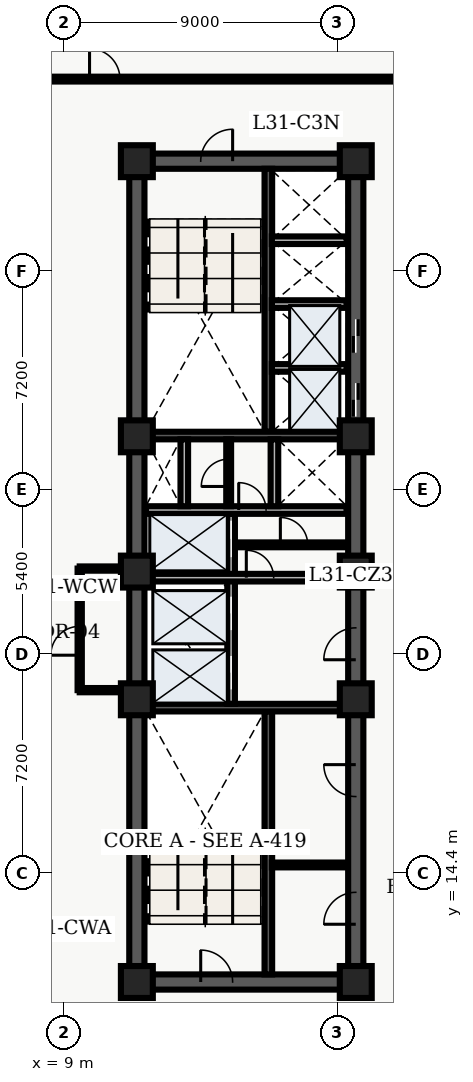
"""IFC4 building model, lengths in metres.
Left out: names, types, materials, properties, quantities, classifications, styles, units other than length and angle.
Written with IfcOpenShell. Run it as: python <this file> out.ifc"""

import sys

from ifc_helpers import new_model, entity, si_unit, converted_unit, direction, frame, origin_with_axes, origin_2d_with_axis, place, context, subcontext, project, spatial, polyline, rectangle, outline, extrude, element, fill, save


model = new_model("IFC4")
c1 = context("Model", 3, precision=1e-05, world=origin_with_axes(), true_north=direction((0.0, 1.0)))
c2 = subcontext(c1, "Body", "Model", "MODEL_VIEW")
j1 = project(units=[si_unit("LENGTHUNIT", "METRE"), converted_unit("PLANEANGLEUNIT", "DEGREE", entity("IfcPlaneAngleMeasure", 0.017), si_unit("PLANEANGLEUNIT", "RADIAN"), dimensions=[0, 0, 0, 0, 0, 0, 0])], contexts=[c1])
p1 = place(None, origin_with_axes())
s1 = spatial("IfcSite", under=j1, at=p1, CompositionType="ELEMENT")
p2 = place(p1, origin_with_axes())
s2 = spatial("IfcBuilding", under=s1, at=p2, CompositionType="ELEMENT")
p3 = place(p2, frame((0.0, 0.0, 129.0), z_axis=(0.0, 0.0, 1.0), x_axis=(1.0, 0.0, 0.0)))
s3 = spatial("IfcBuildingStorey", under=s2, at=p3, CompositionType="ELEMENT", Elevation=129.0)
p4 = place(p3, frame((11.4, 10.8, 0.0), z_axis=(0.0, 0.0, 1.0), x_axis=(0.0, 1.0, 0.0)))
e1 = element("IfcWall", 1, at=p4, inside=s3, PredefinedType="SHEAR", context=c2, shape_type="SweptSolid", body=[
    extrude(outline(polyline([(0.0, -0.25), (27.0, -0.25), (27.0, 0.25), (0.0, 0.25), (0.0, -0.25)])), origin_with_axes(), (0.0, 0.0, 1.0), 3.66),
])
p5 = place(p3, frame((11.4, 10.8, 0.0), z_axis=(0.0, 0.0, 1.0), x_axis=(1.0, 0.0, 0.0)))
e2 = element("IfcWall", 2, at=p5, inside=s3, PredefinedType="SHEAR", context=c2, shape_type="SweptSolid", body=[
    extrude(outline(polyline([(0.0, -0.25), (7.2, -0.25), (7.2, 0.25), (0.0, 0.25), (0.0, -0.25)])), origin_with_axes(), (0.0, 0.0, 1.0), 3.66),
])
p6 = place(p5, frame((2.625, 0.0, 0.0), z_axis=(0.0, 0.0, 1.0), x_axis=(1.0, 0.0, 0.0)))
e3 = element("IfcOpeningElement", 3, at=p6, cuts=e2, PredefinedType="OPENING", context=c2, shape_type="SweptSolid", body=[
    extrude(rectangle(XDim=1.05, YDim=0.52, at=origin_2d_with_axis()), origin_with_axes(), (0.0, 0.0, 1.0), 2.15),
])
p7 = place(p3, frame((11.4, 37.8, 0.0), z_axis=(0.0, 0.0, 1.0), x_axis=(1.0, 0.0, 0.0)))
e4 = element("IfcWall", 4, at=p7, inside=s3, PredefinedType="SHEAR", context=c2, shape_type="SweptSolid", body=[
    extrude(outline(polyline([(0.0, -0.25), (7.2, -0.25), (7.2, 0.25), (0.0, 0.25), (0.0, -0.25)])), origin_with_axes(), (0.0, 0.0, 1.0), 3.66),
])
p8 = place(p7, frame((2.625, 0.0, 0.0), z_axis=(0.0, 0.0, 1.0), x_axis=(1.0, 0.0, 0.0)))
e5 = element("IfcOpeningElement", 5, at=p8, cuts=e4, PredefinedType="OPENING", context=c2, shape_type="SweptSolid", body=[
    extrude(rectangle(XDim=1.05, YDim=0.52, at=origin_2d_with_axis()), origin_with_axes(), (0.0, 0.0, 1.0), 2.15),
])
p9 = place(p3, frame((18.6, 10.8, 0.0), z_axis=(0.0, 0.0, 1.0), x_axis=(0.0, 1.0, 0.0)))
e6 = element("IfcWall", 6, at=p9, inside=s3, PredefinedType="SHEAR", context=c2, shape_type="SweptSolid", body=[
    extrude(outline(polyline([(0.0, -0.25), (13.5, -0.25), (13.5, 0.25), (0.0, 0.25), (0.0, -0.25)])), origin_with_axes(), (0.0, 0.0, 1.0), 3.66),
])
p10 = place(p9, frame((11.125, 0.0, 0.0), z_axis=(0.0, 0.0, 1.0), x_axis=(1.0, 0.0, 0.0)))
e7 = element("IfcOpeningElement", 7, at=p10, cuts=e6, PredefinedType="OPENING", context=c2, shape_type="SweptSolid", body=[
    extrude(rectangle(XDim=1.05, YDim=0.52, at=origin_2d_with_axis()), origin_with_axes(), (0.0, 0.0, 1.0), 2.15),
])
p11 = place(p9, frame((2.425, 0.0, 0.0), z_axis=(0.0, 0.0, 1.0), x_axis=(1.0, 0.0, 0.0)))
e8 = element("IfcOpeningElement", 8, at=p11, cuts=e6, PredefinedType="OPENING", context=c2, shape_type="SweptSolid", body=[
    extrude(rectangle(XDim=1.05, YDim=0.52, at=origin_2d_with_axis()), origin_with_axes(), (0.0, 0.0, 1.0), 2.15),
])
p12 = place(p9, frame((6.625, 0.0, 0.0), z_axis=(0.0, 0.0, 1.0), x_axis=(1.0, 0.0, 0.0)))
e9 = element("IfcOpeningElement", 9, at=p12, cuts=e6, PredefinedType="OPENING", context=c2, shape_type="SweptSolid", body=[
    extrude(rectangle(XDim=1.05, YDim=0.52, at=origin_2d_with_axis()), origin_with_axes(), (0.0, 0.0, 1.0), 2.15),
])
p13 = place(p3, frame((18.6, 24.3, 0.0), z_axis=(0.0, 0.0, 1.0), x_axis=(0.0, 1.0, 0.0)))
e10 = element("IfcWall", 10, at=p13, inside=s3, PredefinedType="SHEAR", context=c2, shape_type="SweptSolid", body=[
    extrude(outline(polyline([(0.0, -0.25), (13.5, -0.25), (13.5, 0.25), (0.0, 0.25), (0.0, -0.25)])), origin_with_axes(), (0.0, 0.0, 1.0), 3.66),
])
p14 = place(p13, frame((5.65, 0.0, 0.0), z_axis=(0.0, 0.0, 1.0), x_axis=(1.0, 0.0, 0.0)))
e11 = element("IfcOpeningElement", 11, at=p14, cuts=e10, PredefinedType="OPENING", context=c2, shape_type="SweptSolid", body=[
    extrude(rectangle(XDim=1.1, YDim=0.52, at=origin_2d_with_axis()), origin_with_axes(), (0.0, 0.0, 1.0), 2.15),
])
p15 = place(p13, frame((7.75, 0.0, 0.0), z_axis=(0.0, 0.0, 1.0), x_axis=(1.0, 0.0, 0.0)))
e12 = element("IfcOpeningElement", 12, at=p15, cuts=e10, PredefinedType="OPENING", context=c2, shape_type="SweptSolid", body=[
    extrude(rectangle(XDim=1.1, YDim=0.52, at=origin_2d_with_axis()), origin_with_axes(), (0.0, 0.0, 1.0), 2.15),
])
p16 = place(p3, frame((15.725, 11.05, 0.0), z_axis=(0.0, 0.0, 1.0), x_axis=(0.0, 1.0, 0.0)))
e13 = element("IfcWall", 13, at=p16, inside=s3, PredefinedType="SHEAR", context=c2, shape_type="SweptSolid", body=[
    extrude(outline(polyline([(0.0, -0.125), (8.65, -0.125), (8.65, 0.125), (0.0, 0.125), (0.0, -0.125)])), origin_with_axes(), (0.0, 0.0, 1.0), 3.66),
])
p17 = place(p3, frame((11.65, 19.825, 0.0), z_axis=(0.0, 0.0, 1.0), x_axis=(1.0, 0.0, 0.0)))
e14 = element("IfcWall", 14, at=p17, inside=s3, PredefinedType="SHEAR", context=c2, shape_type="SweptSolid", body=[
    extrude(outline(polyline([(0.0, -0.125), (6.7, -0.125), (6.7, 0.125), (0.0, 0.125), (0.0, -0.125)])), origin_with_axes(), (0.0, 0.0, 1.0), 3.66),
])
p18 = place(p3, frame((15.725, 28.9, 0.0), z_axis=(0.0, 0.0, 1.0), x_axis=(0.0, 1.0, 0.0)))
e15 = element("IfcWall", 15, at=p18, inside=s3, PredefinedType="SHEAR", context=c2, shape_type="SweptSolid", body=[
    extrude(outline(polyline([(0.0, -0.125), (8.65, -0.125), (8.65, 0.125), (0.0, 0.125), (0.0, -0.125)])), origin_with_axes(), (0.0, 0.0, 1.0), 3.66),
])
p19 = place(p3, frame((11.65, 28.775, 0.0), z_axis=(0.0, 0.0, 1.0), x_axis=(1.0, 0.0, 0.0)))
e16 = element("IfcWall", 16, at=p19, inside=s3, PredefinedType="SHEAR", context=c2, shape_type="SweptSolid", body=[
    extrude(outline(polyline([(0.0, -0.125), (6.7, -0.125), (6.7, 0.125), (0.0, 0.125), (0.0, -0.125)])), origin_with_axes(), (0.0, 0.0, 1.0), 3.66),
])
p20 = place(p3, frame((14.5, 19.95, 0.0), z_axis=(0.0, 0.0, 1.0), x_axis=(0.0, 1.0, 0.0)))
e17 = element("IfcWall", 17, at=p20, inside=s3, PredefinedType="SOLIDWALL", context=c2, shape_type="SweptSolid", body=[
    extrude(outline(polyline([(0.0, -0.125), (6.25, -0.125), (6.25, 0.125), (0.0, 0.125), (0.0, -0.125)])), origin_with_axes(), (0.0, 0.0, 1.0), 2.7),
])
p21 = place(p20, frame((1.025, 0.0, 0.0), z_axis=(0.0, 0.0, 1.0), x_axis=(1.0, 0.0, 0.0)))
e18 = element("IfcOpeningElement", 18, at=p21, cuts=e17, PredefinedType="OPENING", context=c2, shape_type="SweptSolid", body=[
    extrude(rectangle(XDim=1.1, YDim=0.27, at=origin_2d_with_axis()), origin_with_axes(), (0.0, 0.0, 1.0), 2.15),
])
p22 = place(p20, frame((2.975, 0.0, 0.0), z_axis=(0.0, 0.0, 1.0), x_axis=(1.0, 0.0, 0.0)))
e19 = element("IfcOpeningElement", 19, at=p22, cuts=e17, PredefinedType="OPENING", context=c2, shape_type="SweptSolid", body=[
    extrude(rectangle(XDim=1.1, YDim=0.27, at=origin_2d_with_axis()), origin_with_axes(), (0.0, 0.0, 1.0), 2.15),
])
p23 = place(p20, frame((5.425, 0.0, 0.0), z_axis=(0.0, 0.0, 1.0), x_axis=(1.0, 0.0, 0.0)))
e20 = element("IfcOpeningElement", 20, at=p23, cuts=e17, PredefinedType="OPENING", context=c2, shape_type="SweptSolid", body=[
    extrude(rectangle(XDim=1.2, YDim=0.27, at=origin_2d_with_axis()), origin_with_axes(), (0.0, 0.0, 1.0), 2.15),
])
p24 = place(p3, frame((11.7, 24.1, 0.0), z_axis=(0.0, 0.0, 1.0), x_axis=(1.0, 0.0, 0.0)))
e21 = element("IfcWall", 21, at=p24, inside=s3, PredefinedType="SOLIDWALL", context=c2, shape_type="SweptSolid", body=[
    extrude(outline(polyline([(0.0, -0.125), (6.6, -0.125), (6.6, 0.125), (0.0, 0.125), (0.0, -0.125)])), origin_with_axes(), (0.0, 0.0, 1.0), 2.7),
])
p25 = place(p24, frame((3.75, 0.0, 0.0), z_axis=(0.0, 0.0, 1.0), x_axis=(1.0, 0.0, 0.0)))
e22 = element("IfcOpeningElement", 22, at=p25, cuts=e21, PredefinedType="OPENING", context=c2, shape_type="SweptSolid", body=[
    extrude(rectangle(XDim=0.9, YDim=0.27, at=origin_2d_with_axis()), origin_with_axes(), (0.0, 0.0, 1.0), 2.15),
])
p26 = place(p3, frame((11.7, 26.325, 0.0), z_axis=(0.0, 0.0, 1.0), x_axis=(1.0, 0.0, 0.0)))
e23 = element("IfcWall", 23, at=p26, inside=s3, PredefinedType="SOLIDWALL", context=c2, shape_type="SweptSolid", body=[
    extrude(outline(polyline([(0.0, -0.125), (6.6, -0.125), (6.6, 0.125), (0.0, 0.125), (0.0, -0.125)])), origin_with_axes(), (0.0, 0.0, 1.0), 2.7),
])
p27 = place(p26, frame((3.5, 0.0, 0.0), z_axis=(0.0, 0.0, 1.0), x_axis=(1.0, 0.0, 0.0)))
e24 = element("IfcOpeningElement", 24, at=p27, cuts=e23, PredefinedType="OPENING", context=c2, shape_type="SweptSolid", body=[
    extrude(rectangle(XDim=0.9, YDim=0.27, at=origin_2d_with_axis()), origin_with_axes(), (0.0, 0.0, 1.0), 2.15),
])
for number, where, z_axis, x_axis in (
    (25, (12.96, 26.45, 0.0), (0.0, 0.0, 1.0), (0.0, 1.0, 0.0)),
    (26, (15.925, 26.45, 0.0), (0.0, 0.0, 1.0), (0.0, 1.0, 0.0)),
):
    element("IfcWall", number, at=place(p3, frame(where, z_axis=z_axis, x_axis=x_axis)), inside=s3, PredefinedType="SOLIDWALL", context=c2, shape_type="SweptSolid", body=[
        extrude(outline(polyline([(0.0, -0.125), (2.2, -0.125), (2.2, 0.125), (0.0, 0.125), (0.0, -0.125)])), origin_with_axes(), (0.0, 0.0, 1.0), 2.7),
    ])
for number, where, z_axis, x_axis in (
    (27, (11.4, 10.8, 0.0), (0.0, 0.0, 1.0), (1.0, 0.0, 0.0)),
    (28, (11.4, 20.1, 0.0), (0.0, 0.0, 1.0), (1.0, 0.0, 0.0)),
    (29, (11.4, 24.3, 0.0), (0.0, 0.0, 1.0), (1.0, 0.0, 0.0)),
    (30, (11.4, 28.75, 0.0), (0.0, 0.0, 1.0), (1.0, 0.0, 0.0)),
    (31, (11.4, 37.8, 0.0), (0.0, 0.0, 1.0), (1.0, 0.0, 0.0)),
    (32, (18.6, 10.8, 0.0), (0.0, 0.0, 1.0), (1.0, 0.0, 0.0)),
    (33, (18.6, 20.1, 0.0), (0.0, 0.0, 1.0), (1.0, 0.0, 0.0)),
    (34, (18.6, 24.3, 0.0), (0.0, 0.0, 1.0), (1.0, 0.0, 0.0)),
    (35, (18.6, 28.75, 0.0), (0.0, 0.0, 1.0), (1.0, 0.0, 0.0)),
    (36, (18.6, 37.8, 0.0), (0.0, 0.0, 1.0), (1.0, 0.0, 0.0)),
):
    element("IfcColumn", number, at=place(p3, frame(where, z_axis=z_axis, x_axis=x_axis)), inside=s3, PredefinedType="COLUMN", context=c2, shape_type="SweptSolid", body=[
        extrude(rectangle(XDim=1.05, YDim=1.05, at=origin_2d_with_axis()), origin_with_axes(), (0.0, 0.0, 1.0), 3.9),
    ])
p28 = place(p3, frame((14.62, 25.18, 0.0), z_axis=(0.0, 0.0, 1.0), x_axis=(1.0, 0.0, 0.0)))
e37 = element("IfcWall", 37, at=p28, inside=s3, PredefinedType="PARTITIONING", context=c2, shape_type="SweptSolid", body=[
    extrude(outline(polyline([(0.0, -0.08), (3.68, -0.08), (3.68, 0.08), (0.0, 0.08), (0.0, -0.08)])), origin_with_axes(), (0.0, 0.0, 1.0), 2.7),
])
p29 = place(p28, frame((1.95, 0.0, 0.0), z_axis=(0.0, 0.0, 1.0), x_axis=(1.0, 0.0, 0.0)))
e38 = element("IfcOpeningElement", 38, at=p29, cuts=e37, PredefinedType="OPENING", context=c2, shape_type="SweptSolid", body=[
    extrude(rectangle(XDim=0.9, YDim=0.18, at=origin_2d_with_axis()), origin_with_axes(), (0.0, 0.0, 1.0), 2.15),
])
p30 = place(p3, frame((14.42, 26.45, 0.0), z_axis=(0.0, 0.0, 1.0), x_axis=(0.0, 1.0, 0.0)))
e39 = element("IfcWall", 39, at=p30, inside=s3, PredefinedType="PARTITIONING", context=c2, shape_type="SweptSolid", body=[
    extrude(outline(polyline([(0.0, -0.08), (2.2, -0.08), (2.2, 0.08), (0.0, 0.08), (0.0, -0.08)])), origin_with_axes(), (0.0, 0.0, 1.0), 2.7),
])
p31 = place(p30, frame((1.1, 0.0, 0.0), z_axis=(0.0, 0.0, 1.0), x_axis=(1.0, 0.0, 0.0)))
e40 = element("IfcOpeningElement", 40, at=p31, cuts=e39, PredefinedType="OPENING", context=c2, shape_type="SweptSolid", body=[
    extrude(rectangle(XDim=0.9, YDim=0.18, at=origin_2d_with_axis()), origin_with_axes(), (0.0, 0.0, 1.0), 2.15),
])
p32 = place(p3, frame((15.84, 14.65, 0.0), z_axis=(0.0, 0.0, 1.0), x_axis=(1.0, 0.0, 0.0)))
e41 = element("IfcWall", 41, at=p32, inside=s3, PredefinedType="PARTITIONING", context=c2, shape_type="SweptSolid", body=[
    extrude(outline(polyline([(0.0, -0.08), (2.46, -0.08), (2.46, 0.08), (0.0, 0.08), (0.0, -0.08)])), origin_with_axes(), (0.0, 0.0, 1.0), 2.7),
])
for number, where, z_axis, x_axis in (
    (42, (15.84, 31.0, 0.0), (0.0, 0.0, 1.0), (1.0, 0.0, 0.0)),
    (43, (15.84, 33.1, 0.0), (0.0, 0.0, 1.0), (1.0, 0.0, 0.0)),
    (44, (15.84, 35.2, 0.0), (0.0, 0.0, 1.0), (1.0, 0.0, 0.0)),
):
    element("IfcWall", number, at=place(p3, frame(where, z_axis=z_axis, x_axis=x_axis)), inside=s3, PredefinedType="SOLIDWALL", context=c2, shape_type="SweptSolid", body=[
        extrude(outline(polyline([(0.0, -0.125), (2.46, -0.125), (2.46, 0.125), (0.0, 0.125), (0.0, -0.125)])), origin_with_axes(), (0.0, 0.0, 1.0), 2.7),
    ])
p33 = place(p3, frame((9.52, 20.4, 0.0), z_axis=(0.0, 0.0, 1.0), x_axis=(0.0, 1.0, 0.0)))
e45 = element("IfcWall", 45, at=p33, inside=s3, PredefinedType="PARTITIONING", context=c2, shape_type="SweptSolid", body=[
    extrude(outline(polyline([(0.0, -0.07), (4.0, -0.07), (4.0, 0.07), (0.0, 0.07), (0.0, -0.07)])), origin_with_axes(), (0.0, 0.0, 1.0), 2.7),
])
p34 = place(p33, frame((1.625, 0.0, 0.0), z_axis=(0.0, 0.0, 1.0), x_axis=(1.0, 0.0, 0.0)))
e46 = element("IfcOpeningElement", 46, at=p34, cuts=e45, PredefinedType="OPENING", context=c2, shape_type="SweptSolid", body=[
    extrude(rectangle(XDim=0.95, YDim=0.16, at=origin_2d_with_axis()), origin_with_axes(), (0.0, 0.0, 1.0), 2.15),
])
for number, where, z_axis, x_axis in (
    (47, (9.52, 20.4, 0.0), (0.0, 0.0, 1.0), (1.0, 0.0, 0.0)),
    (48, (9.52, 24.4, 0.0), (0.0, 0.0, 1.0), (1.0, 0.0, 0.0)),
):
    element("IfcWall", number, at=place(p3, frame(where, z_axis=z_axis, x_axis=x_axis)), inside=s3, PredefinedType="PARTITIONING", context=c2, shape_type="SweptSolid", body=[
        extrude(outline(polyline([(0.0, -0.07), (1.58, -0.07), (1.58, 0.07), (0.0, 0.07), (0.0, -0.07)])), origin_with_axes(), (0.0, 0.0, 1.0), 2.7),
    ])
p35 = place(p3, frame((2.6, 40.5, 0.0), z_axis=(0.0, 0.0, 1.0), x_axis=(1.0, 0.0, 0.0)))
e49 = element("IfcWall", 49, at=p35, inside=s3, PredefinedType="PARTITIONING", context=c2, shape_type="SweptSolid", body=[
    extrude(outline(polyline([(0.0, -0.08), (18.693, -0.08), (18.693, 0.08), (0.0, 0.08), (0.0, -0.08)])), origin_with_axes(), (0.0, 0.0, 1.0), 2.7),
])
p36 = place(p35, frame((7.744, 0.0, 0.0), z_axis=(0.0, 0.0, 1.0), x_axis=(1.0, 0.0, 0.0)))
e50 = element("IfcOpeningElement", 50, at=p36, cuts=e49, PredefinedType="OPENING", context=c2, shape_type="SweptSolid", body=[
    extrude(rectangle(XDim=1.0, YDim=0.18, at=origin_2d_with_axis()), origin_with_axes(), (0.0, 0.0, 1.0), 2.15),
])
p37 = place(p13, frame((5.65, 0.0, 0.0), z_axis=(0.0, 0.0, 1.0), x_axis=(1.0, 0.0, 0.0)))
e51 = element("IfcDoor", 51, at=p37, inside=s3, OperationType="SLIDING_TO_LEFT", PredefinedType="DOOR", context=c2, shape_type="SweptSolid", body=[
    extrude(rectangle(XDim=1.1, YDim=0.09, at=origin_2d_with_axis()), origin_with_axes(), (0.0, 0.0, 1.0), 2.15),
])
fill(e11, e51)
p38 = place(p13, frame((7.75, 0.0, 0.0), z_axis=(0.0, 0.0, 1.0), x_axis=(1.0, 0.0, 0.0)))
e52 = element("IfcDoor", 52, at=p38, inside=s3, OperationType="SLIDING_TO_RIGHT", PredefinedType="DOOR", context=c2, shape_type="SweptSolid", body=[
    extrude(rectangle(XDim=1.1, YDim=0.09, at=origin_2d_with_axis()), origin_with_axes(), (0.0, 0.0, 1.0), 2.15),
])
fill(e12, e52)
p39 = place(p20, frame((1.025, 0.0, 0.0), z_axis=(0.0, 0.0, 1.0), x_axis=(1.0, 0.0, 0.0)))
e53 = element("IfcDoor", 53, at=p39, inside=s3, OperationType="SLIDING_TO_LEFT", PredefinedType="DOOR", context=c2, shape_type="SweptSolid", body=[
    extrude(rectangle(XDim=1.1, YDim=0.09, at=origin_2d_with_axis()), origin_with_axes(), (0.0, 0.0, 1.0), 2.15),
])
fill(e18, e53)
p40 = place(p20, frame((2.975, 0.0, 0.0), z_axis=(0.0, 0.0, 1.0), x_axis=(1.0, 0.0, 0.0)))
e54 = element("IfcDoor", 54, at=p40, inside=s3, OperationType="SLIDING_TO_RIGHT", PredefinedType="DOOR", context=c2, shape_type="SweptSolid", body=[
    extrude(rectangle(XDim=1.1, YDim=0.09, at=origin_2d_with_axis()), origin_with_axes(), (0.0, 0.0, 1.0), 2.15),
])
fill(e19, e54)
p41 = place(p20, frame((5.425, 0.0, 0.0), z_axis=(0.0, 0.0, 1.0), x_axis=(1.0, 0.0, 0.0)))
e55 = element("IfcDoor", 55, at=p41, inside=s3, OperationType="DOUBLE_DOOR_SLIDING", PredefinedType="DOOR", context=c2, shape_type="SweptSolid", body=[
    extrude(rectangle(XDim=1.2, YDim=0.09, at=origin_2d_with_axis()), origin_with_axes(), (0.0, 0.0, 1.0), 2.15),
])
fill(e20, e55)
p42 = place(p5, frame((2.625, 0.0, 0.0), z_axis=(0.0, 0.0, 1.0), x_axis=(1.0, 0.0, 0.0)))
e56 = element("IfcDoor", 56, at=p42, inside=s3, OperationType="SINGLE_SWING_LEFT", PredefinedType="DOOR", context=c2, shape_type="SweptSolid", body=[
    extrude(rectangle(XDim=1.05, YDim=0.09, at=origin_2d_with_axis()), origin_with_axes(), (0.0, 0.0, 1.0), 2.15),
])
fill(e3, e56)
p43 = place(p7, frame((2.625, 0.0, 0.0), z_axis=(0.0, 0.0, 1.0), x_axis=(1.0, 0.0, 0.0)))
e57 = element("IfcDoor", 57, at=p43, inside=s3, OperationType="SINGLE_SWING_RIGHT", PredefinedType="DOOR", context=c2, shape_type="SweptSolid", body=[
    extrude(rectangle(XDim=1.05, YDim=0.09, at=origin_2d_with_axis()), origin_with_axes(), (0.0, 0.0, 1.0), 2.15),
])
fill(e5, e57)
p44 = place(p9, frame((11.125, 0.0, 0.0), z_axis=(0.0, 0.0, 1.0), x_axis=(1.0, 0.0, 0.0)))
e58 = element("IfcDoor", 58, at=p44, inside=s3, OperationType="SINGLE_SWING_LEFT", PredefinedType="DOOR", context=c2, shape_type="SweptSolid", body=[
    extrude(rectangle(XDim=1.05, YDim=0.09, at=origin_2d_with_axis()), origin_with_axes(), (0.0, 0.0, 1.0), 2.15),
])
fill(e7, e58)
p45 = place(p26, frame((3.5, 0.0, 0.0), z_axis=(0.0, 0.0, 1.0), x_axis=(1.0, 0.0, 0.0)))
e59 = element("IfcDoor", 59, at=p45, inside=s3, OperationType="SINGLE_SWING_LEFT", PredefinedType="DOOR", context=c2, shape_type="SweptSolid", body=[
    extrude(rectangle(XDim=0.9, YDim=0.09, at=origin_2d_with_axis()), origin_with_axes(), (0.0, 0.0, 1.0), 2.15),
])
fill(e24, e59)
p46 = place(p30, frame((1.1, 0.0, 0.0), z_axis=(0.0, 0.0, 1.0), x_axis=(1.0, 0.0, 0.0)))
e60 = element("IfcDoor", 60, at=p46, inside=s3, OperationType="SINGLE_SWING_LEFT", PredefinedType="DOOR", context=c2, shape_type="SweptSolid", body=[
    extrude(rectangle(XDim=0.9, YDim=0.09, at=origin_2d_with_axis()), origin_with_axes(), (0.0, 0.0, 1.0), 2.15),
])
fill(e40, e60)
p47 = place(p24, frame((3.75, 0.0, 0.0), z_axis=(0.0, 0.0, 1.0), x_axis=(1.0, 0.0, 0.0)))
e61 = element("IfcDoor", 61, at=p47, inside=s3, OperationType="SINGLE_SWING_LEFT", PredefinedType="DOOR", context=c2, shape_type="SweptSolid", body=[
    extrude(rectangle(XDim=0.9, YDim=0.09, at=origin_2d_with_axis()), origin_with_axes(), (0.0, 0.0, 1.0), 2.15),
])
fill(e22, e61)
p48 = place(p28, frame((1.95, 0.0, 0.0), z_axis=(0.0, 0.0, 1.0), x_axis=(1.0, 0.0, 0.0)))
e62 = element("IfcDoor", 62, at=p48, inside=s3, OperationType="SINGLE_SWING_LEFT", PredefinedType="DOOR", context=c2, shape_type="SweptSolid", body=[
    extrude(rectangle(XDim=0.9, YDim=0.09, at=origin_2d_with_axis()), origin_with_axes(), (0.0, 0.0, 1.0), 2.15),
])
fill(e38, e62)
p49 = place(p9, frame((2.425, 0.0, 0.0), z_axis=(0.0, 0.0, 1.0), x_axis=(1.0, 0.0, 0.0)))
e63 = element("IfcDoor", 63, at=p49, inside=s3, OperationType="SINGLE_SWING_LEFT", PredefinedType="DOOR", context=c2, shape_type="SweptSolid", body=[
    extrude(rectangle(XDim=1.05, YDim=0.09, at=origin_2d_with_axis()), origin_with_axes(), (0.0, 0.0, 1.0), 2.15),
])
fill(e8, e63)
p50 = place(p9, frame((6.625, 0.0, 0.0), z_axis=(0.0, 0.0, 1.0), x_axis=(1.0, 0.0, 0.0)))
e64 = element("IfcDoor", 64, at=p50, inside=s3, OperationType="SINGLE_SWING_RIGHT", PredefinedType="DOOR", context=c2, shape_type="SweptSolid", body=[
    extrude(rectangle(XDim=1.05, YDim=0.09, at=origin_2d_with_axis()), origin_with_axes(), (0.0, 0.0, 1.0), 2.15),
])
fill(e9, e64)
p51 = place(p33, frame((1.625, 0.0, 0.0), z_axis=(0.0, 0.0, 1.0), x_axis=(1.0, 0.0, 0.0)))
e65 = element("IfcDoor", 65, at=p51, inside=s3, OperationType="SINGLE_SWING_LEFT", PredefinedType="DOOR", context=c2, shape_type="SweptSolid", body=[
    extrude(rectangle(XDim=0.95, YDim=0.084, at=origin_2d_with_axis()), origin_with_axes(), (0.0, 0.0, 1.0), 2.15),
])
fill(e46, e65)
p52 = place(p35, frame((7.744, 0.0, 0.0), z_axis=(0.0, 0.0, 1.0), x_axis=(1.0, 0.0, 0.0)))
e66 = element("IfcDoor", 66, at=p52, inside=s3, OperationType="SINGLE_SWING_LEFT", PredefinedType="DOOR", context=c2, shape_type="SweptSolid", body=[
    extrude(rectangle(XDim=1.0, YDim=0.09, at=origin_2d_with_axis()), origin_with_axes(), (0.0, 0.0, 1.0), 2.15),
])
fill(e50, e66)
save(model, sys.argv[1])
